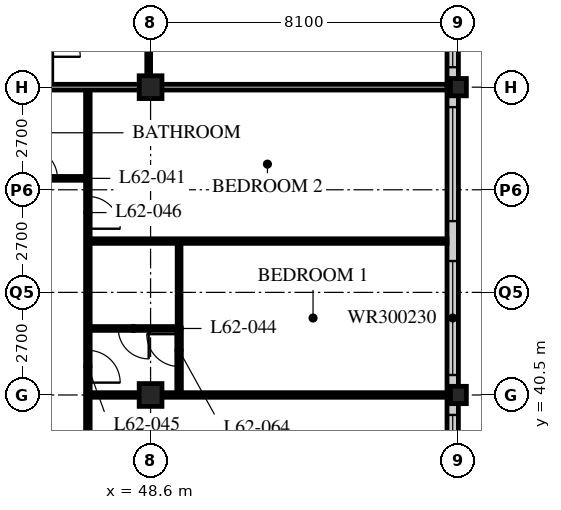
"""IFC4 building model, lengths in metres.
Left out: names, types, materials, properties, quantities, classifications, styles, units other than length and angle.
Written with IfcOpenShell. Run it as: python <this file> out.ifc"""

import sys

from ifc_helpers import new_model, si_unit, direction, frame, frame_2d, origin, origin_2d, place, context, subcontext, project, spatial, rectangle, hollow_rectangle, i_section, extrude, element, fill, save


model = new_model("IFC4")
c1 = context("Model", 3, precision=1e-05, world=origin(), true_north=direction((0.0, 1.0)))
c2 = subcontext(c1, "Body", "Model", "MODEL_VIEW")
j1 = project(units=[si_unit("LENGTHUNIT", "METRE"), si_unit("PLANEANGLEUNIT", "RADIAN")], contexts=[c1])
p1 = place(None, origin())
s1 = spatial("IfcSite", under=j1, at=p1, CompositionType="ELEMENT")
p2 = place(p1, origin())
s2 = spatial("IfcBuilding", under=s1, at=p2, CompositionType="ELEMENT")
p3 = place(p2, frame((0.0, 0.0, 242.4)))
s3 = spatial("IfcBuildingStorey", under=s2, at=p3, CompositionType="ELEMENT", Elevation=242.4)
for number, where, z_axis, x_axis in (
    (1, (48.6, 40.5, 0.0), (0.0, 0.0, 1.0), (1.0, 0.0, 0.0)),
    (2, (48.6, 48.6, 0.0), (0.0, 0.0, 1.0), (1.0, 0.0, 0.0)),
):
    element("IfcColumn", number, at=place(p3, frame(where, z_axis=z_axis, x_axis=x_axis)), inside=s3, PredefinedType="COLUMN", context=c2, shape_type="SweptSolid", body=[
        extrude(hollow_rectangle(XDim=0.6, YDim=0.6, WallThickness=0.05, at=origin_2d()), origin(), (0.0, 0.0, 1.0), 3.9),
    ])
for number, where, z_axis, x_axis in (
    (3, (56.7, 40.5, 0.0), (0.0, 0.0, 1.0), (1.0, 0.0, 0.0)),
    (4, (56.7, 48.6, 0.0), (0.0, 0.0, 1.0), (1.0, 0.0, 0.0)),
):
    element("IfcColumn", number, at=place(p3, frame(where, z_axis=z_axis, x_axis=x_axis)), inside=s3, PredefinedType="COLUMN", context=c2, shape_type="SweptSolid", body=[
        extrude(i_section(OverallWidth=0.418, OverallDepth=0.456, WebThickness=0.042, FlangeThickness=0.067, FilletRadius=0.015, at=origin_2d()), origin(), (0.0, 0.0, 1.0), 3.9),
    ])
p4 = place(p3, frame((56.55, 24.6, 0.0), z_axis=(0.0, 0.0, 1.0), x_axis=(0.0, 1.0, 0.0)))
e5 = element("IfcWall", 5, at=p4, inside=s3, PredefinedType="SOLIDWALL", context=c2, shape_type="SweptSolid", body=[
    extrude(rectangle(XDim=32.1, YDim=0.3, at=frame_2d((16.05, 0.0))), origin(), (0.0, 0.0, 1.0), 3.69),
])
p5 = place(p4, frame((0.225, 0.0, 0.6)))
e6 = element("IfcOpeningElement", 6, at=p5, cuts=e5, PredefinedType="OPENING", context=c2, shape_type="SweptSolid", body=[
    extrude(rectangle(XDim=3.0, YDim=2.3, at=frame_2d((1.5, 1.15))), frame((0.0, 0.16, 0.0), z_axis=(0.0, -1.0, 0.0), x_axis=(1.0, 0.0, 0.0)), (0.0, 0.0, 1.0), 0.32),
])
p6 = place(p4, frame((4.275, 0.0, 0.6)))
e7 = element("IfcOpeningElement", 7, at=p6, cuts=e5, PredefinedType="OPENING", context=c2, shape_type="SweptSolid", body=[
    extrude(rectangle(XDim=3.0, YDim=2.3, at=frame_2d((1.5, 1.15))), frame((0.0, 0.16, 0.0), z_axis=(0.0, -1.0, 0.0), x_axis=(1.0, 0.0, 0.0)), (0.0, 0.0, 1.0), 0.32),
])
p7 = place(p4, frame((8.325, 0.0, 0.6)))
e8 = element("IfcOpeningElement", 8, at=p7, cuts=e5, PredefinedType="OPENING", context=c2, shape_type="SweptSolid", body=[
    extrude(rectangle(XDim=3.0, YDim=2.3, at=frame_2d((1.5, 1.15))), frame((0.0, 0.16, 0.0), z_axis=(0.0, -1.0, 0.0), x_axis=(1.0, 0.0, 0.0)), (0.0, 0.0, 1.0), 0.32),
])
p8 = place(p4, frame((12.375, 0.0, 0.6)))
e9 = element("IfcOpeningElement", 9, at=p8, cuts=e5, PredefinedType="OPENING", context=c2, shape_type="SweptSolid", body=[
    extrude(rectangle(XDim=3.0, YDim=2.3, at=frame_2d((1.5, 1.15))), frame((0.0, 0.16, 0.0), z_axis=(0.0, -1.0, 0.0), x_axis=(1.0, 0.0, 0.0)), (0.0, 0.0, 1.0), 0.32),
])
p9 = place(p4, frame((16.425, 0.0, 0.6)))
e10 = element("IfcOpeningElement", 10, at=p9, cuts=e5, PredefinedType="OPENING", context=c2, shape_type="SweptSolid", body=[
    extrude(rectangle(XDim=3.0, YDim=2.3, at=frame_2d((1.5, 1.15))), frame((0.0, 0.16, 0.0), z_axis=(0.0, -1.0, 0.0), x_axis=(1.0, 0.0, 0.0)), (0.0, 0.0, 1.0), 0.32),
])
p10 = place(p4, frame((20.475, 0.0, 0.6)))
e11 = element("IfcOpeningElement", 11, at=p10, cuts=e5, PredefinedType="OPENING", context=c2, shape_type="SweptSolid", body=[
    extrude(rectangle(XDim=3.0, YDim=2.3, at=frame_2d((1.5, 1.15))), frame((0.0, 0.16, 0.0), z_axis=(0.0, -1.0, 0.0), x_axis=(1.0, 0.0, 0.0)), (0.0, 0.0, 1.0), 0.32),
])
p11 = place(p4, frame((24.525, 0.0, 0.6)))
e12 = element("IfcOpeningElement", 12, at=p11, cuts=e5, PredefinedType="OPENING", context=c2, shape_type="SweptSolid", body=[
    extrude(rectangle(XDim=3.0, YDim=2.3, at=frame_2d((1.5, 1.15))), frame((0.0, 0.16, 0.0), z_axis=(0.0, -1.0, 0.0), x_axis=(1.0, 0.0, 0.0)), (0.0, 0.0, 1.0), 0.32),
])
p12 = place(p4, frame((28.575, 0.0, 0.6)))
e13 = element("IfcOpeningElement", 13, at=p12, cuts=e5, PredefinedType="OPENING", context=c2, shape_type="SweptSolid", body=[
    extrude(rectangle(XDim=3.0, YDim=2.3, at=frame_2d((1.5, 1.15))), frame((0.0, 0.16, 0.0), z_axis=(0.0, -1.0, 0.0), x_axis=(1.0, 0.0, 0.0)), (0.0, 0.0, 1.0), 0.32),
])
p13 = place(p3, frame((46.95, 22.5, 0.0), z_axis=(0.0, 0.0, 1.0), x_axis=(0.0, 1.0, 0.0)))
e14 = element("IfcWall", 14, at=p13, inside=s3, PredefinedType="PARTITIONING", context=c2, shape_type="SweptSolid", body=[
    extrude(rectangle(XDim=26.1, YDim=0.12, at=frame_2d((13.05, 0.0))), origin(), (0.0, 0.0, 1.0), 3.69),
])
p14 = place(p13, frame((0.975, 0.0, 0.0)))
e15 = element("IfcOpeningElement", 15, at=p14, cuts=e14, PredefinedType="OPENING", context=c2, shape_type="SweptSolid", body=[
    extrude(rectangle(XDim=0.85, YDim=2.1, at=frame_2d((0.425, 1.05))), frame((0.0, 0.07, 0.0), z_axis=(0.0, -1.0, 0.0), x_axis=(1.0, 0.0, 0.0)), (0.0, 0.0, 1.0), 0.14),
])
p15 = place(p13, frame((6.175, 0.0, 0.0)))
e16 = element("IfcOpeningElement", 16, at=p15, cuts=e14, PredefinedType="OPENING", context=c2, shape_type="SweptSolid", body=[
    extrude(rectangle(XDim=0.85, YDim=2.1, at=frame_2d((0.425, 1.05))), frame((0.0, 0.07, 0.0), z_axis=(0.0, -1.0, 0.0), x_axis=(1.0, 0.0, 0.0)), (0.0, 0.0, 1.0), 0.14),
])
p16 = place(p13, frame((10.875, 0.0, 0.0)))
e17 = element("IfcOpeningElement", 17, at=p16, cuts=e14, PredefinedType="OPENING", context=c2, shape_type="SweptSolid", body=[
    extrude(rectangle(XDim=0.85, YDim=2.1, at=frame_2d((0.425, 1.05))), frame((0.0, 0.07, 0.0), z_axis=(0.0, -1.0, 0.0), x_axis=(1.0, 0.0, 0.0)), (0.0, 0.0, 1.0), 0.14),
])
p17 = place(p13, frame((18.325, 0.0, 0.0)))
e18 = element("IfcOpeningElement", 18, at=p17, cuts=e14, PredefinedType="OPENING", context=c2, shape_type="SweptSolid", body=[
    extrude(rectangle(XDim=0.85, YDim=2.1, at=frame_2d((0.425, 1.05))), frame((0.0, 0.07, 0.0), z_axis=(0.0, -1.0, 0.0), x_axis=(1.0, 0.0, 0.0)), (0.0, 0.0, 1.0), 0.14),
])
p18 = place(p13, frame((22.375, 0.0, 0.0)))
e19 = element("IfcOpeningElement", 19, at=p18, cuts=e14, PredefinedType="OPENING", context=c2, shape_type="SweptSolid", body=[
    extrude(rectangle(XDim=0.85, YDim=2.1, at=frame_2d((0.425, 1.05))), frame((0.0, 0.07, 0.0), z_axis=(0.0, -1.0, 0.0), x_axis=(1.0, 0.0, 0.0)), (0.0, 0.0, 1.0), 0.14),
])
p19 = place(p3, frame((44.55, 46.2, 0.0), z_axis=(0.0, 0.0, 1.0), x_axis=(1.0, 0.0, 0.0)))
e20 = element("IfcWall", 20, at=p19, inside=s3, PredefinedType="PARTITIONING", context=c2, shape_type="SweptSolid", body=[
    extrude(rectangle(XDim=2.4, YDim=0.1, at=frame_2d((1.2, 0.0))), origin(), (0.0, 0.0, 1.0), 3.69),
])
p20 = place(p19, frame((0.8, 0.0, 0.0)))
e21 = element("IfcOpeningElement", 21, at=p20, cuts=e20, PredefinedType="OPENING", context=c2, shape_type="SweptSolid", body=[
    extrude(rectangle(XDim=0.8, YDim=2.1, at=frame_2d((0.4, 1.05))), frame((0.0, 0.06, 0.0), z_axis=(0.0, -1.0, 0.0), x_axis=(1.0, 0.0, 0.0)), (0.0, 0.0, 1.0), 0.12),
])
p21 = place(p3, frame((46.95, 42.25, 0.0), z_axis=(0.0, 0.0, 1.0), x_axis=(1.0, 0.0, 0.0)))
e22 = element("IfcWall", 22, at=p21, inside=s3, PredefinedType="PARTITIONING", context=c2, shape_type="SweptSolid", body=[
    extrude(rectangle(XDim=2.4, YDim=0.1, at=frame_2d((1.2, 0.0))), origin(), (0.0, 0.0, 1.0), 3.69),
])
p22 = place(p21, frame((0.8, 0.0, 0.0)))
e23 = element("IfcOpeningElement", 23, at=p22, cuts=e22, PredefinedType="OPENING", context=c2, shape_type="SweptSolid", body=[
    extrude(rectangle(XDim=0.8, YDim=2.1, at=frame_2d((0.4, 1.05))), frame((0.0, 0.06, 0.0), z_axis=(0.0, -1.0, 0.0), x_axis=(1.0, 0.0, 0.0)), (0.0, 0.0, 1.0), 0.12),
])
p23 = place(p3, frame((49.35, 42.25, 0.0), z_axis=(0.0, 0.0, 1.0), x_axis=(0.0, 1.0, 0.0)))
e24 = element("IfcWall", 24, at=p23, inside=s3, PredefinedType="PARTITIONING", context=c2, shape_type="SweptSolid", body=[
    extrude(rectangle(XDim=2.3, YDim=0.1, at=frame_2d((1.15, 0.0))), origin(), (0.0, 0.0, 1.0), 3.69),
])
p24 = place(p3, frame((46.95, 40.5, 0.0), z_axis=(0.0, 0.0, 1.0), x_axis=(1.0, 0.0, 0.0)))
e25 = element("IfcWall", 25, at=p24, inside=s3, PredefinedType="PARTITIONING", context=c2, shape_type="SweptSolid", body=[
    extrude(rectangle(XDim=9.45, YDim=0.12, at=frame_2d((4.725, 0.0))), origin(), (0.0, 0.0, 1.0), 2.928),
])
p25 = place(p3, frame((46.95, 44.55, 0.0), z_axis=(0.0, 0.0, 1.0), x_axis=(1.0, 0.0, 0.0)))
e26 = element("IfcWall", 26, at=p25, inside=s3, PredefinedType="PARTITIONING", context=c2, shape_type="SweptSolid", body=[
    extrude(rectangle(XDim=9.45, YDim=0.12, at=frame_2d((4.725, 0.0))), origin(), (0.0, 0.0, 1.0), 3.69),
])
p26 = place(p3, frame((48.55, 48.6, 0.0), z_axis=(0.0, 0.0, 1.0), x_axis=(0.0, 1.0, 0.0)))
e27 = element("IfcWall", 27, at=p26, inside=s3, PredefinedType="PARTITIONING", context=c2, shape_type="SweptSolid", body=[
    extrude(rectangle(XDim=2.4, YDim=0.1, at=frame_2d((1.2, 0.0))), origin(), (0.0, 0.0, 1.0), 2.928),
])
p27 = place(p3, frame((44.55, 48.6, 0.0), z_axis=(0.0, 0.0, 1.0), x_axis=(1.0, 0.0, 0.0)))
e28 = element("IfcWall", 28, at=p27, inside=s3, PredefinedType="PARTITIONING", context=c2, shape_type="SweptSolid", body=[
    extrude(rectangle(XDim=11.85, YDim=0.15, at=frame_2d((5.925, 0.0))), origin(), (0.0, 0.0, 1.0), 2.928),
])
p28 = place(p3, frame((49.35, 42.26, 0.0), z_axis=(0.0, 0.0, 1.0), x_axis=(0.0, -1.0, 0.0)))
e29 = element("IfcWall", 29, at=p28, inside=s3, PredefinedType="PARTITIONING", context=c2, shape_type="SweptSolid", body=[
    extrude(rectangle(XDim=1.76, YDim=0.12, at=frame_2d((0.88, 0.0))), origin(), (0.0, 0.0, 1.0), 3.69),
])
p29 = place(p28, frame((0.16, 0.0, 0.0)))
e30 = element("IfcOpeningElement", 30, at=p29, cuts=e29, PredefinedType="OPENING", context=c2, shape_type="SweptSolid", body=[
    extrude(rectangle(XDim=0.85, YDim=2.1, at=frame_2d((0.425, 1.05))), frame((0.0, 0.07, 0.0), z_axis=(0.0, -1.0, 0.0), x_axis=(1.0, 0.0, 0.0)), (0.0, 0.0, 1.0), 0.14),
])
p30 = place(p8, origin())
e31 = element("IfcWindow", 31, at=p30, inside=s3, PartitioningType="SINGLE_PANEL", PredefinedType="WINDOW", context=c2, shape_type="SweptSolid", body=[
    extrude(rectangle(XDim=3.0, YDim=2.3, at=frame_2d((1.5, 1.15))), frame((0.0, 0.03, 0.0), z_axis=(0.0, -1.0, 0.0), x_axis=(1.0, 0.0, 0.0)), (0.0, 0.0, 1.0), 0.06),
])
fill(e9, e31)
p31 = place(p9, origin())
e32 = element("IfcWindow", 32, at=p31, inside=s3, PartitioningType="SINGLE_PANEL", PredefinedType="WINDOW", context=c2, shape_type="SweptSolid", body=[
    extrude(rectangle(XDim=3.0, YDim=2.3, at=frame_2d((1.5, 1.15))), frame((0.0, 0.03, 0.0), z_axis=(0.0, -1.0, 0.0), x_axis=(1.0, 0.0, 0.0)), (0.0, 0.0, 1.0), 0.06),
])
fill(e10, e32)
p32 = place(p10, origin())
e33 = element("IfcWindow", 33, at=p32, inside=s3, PartitioningType="SINGLE_PANEL", PredefinedType="WINDOW", context=c2, shape_type="SweptSolid", body=[
    extrude(rectangle(XDim=3.0, YDim=2.3, at=frame_2d((1.5, 1.15))), frame((0.0, 0.03, 0.0), z_axis=(0.0, -1.0, 0.0), x_axis=(1.0, 0.0, 0.0)), (0.0, 0.0, 1.0), 0.06),
])
fill(e11, e33)
p33 = place(p11, origin())
e34 = element("IfcWindow", 34, at=p33, inside=s3, PartitioningType="SINGLE_PANEL", PredefinedType="WINDOW", context=c2, shape_type="SweptSolid", body=[
    extrude(rectangle(XDim=3.0, YDim=2.3, at=frame_2d((1.5, 1.15))), frame((0.0, 0.03, 0.0), z_axis=(0.0, -1.0, 0.0), x_axis=(1.0, 0.0, 0.0)), (0.0, 0.0, 1.0), 0.06),
])
fill(e12, e34)
p34 = place(p20, origin())
e35 = element("IfcDoor", 35, at=p34, inside=s3, OperationType="SINGLE_SWING_LEFT", PredefinedType="DOOR", context=c2, shape_type="SweptSolid", body=[
    extrude(rectangle(XDim=0.8, YDim=2.1, at=frame_2d((0.4, 1.05))), frame((0.0, 0.025, 0.0), z_axis=(0.0, -1.0, 0.0), x_axis=(1.0, 0.0, 0.0)), (0.0, 0.0, 1.0), 0.05),
])
fill(e21, e35)
p35 = place(p22, origin())
e36 = element("IfcDoor", 36, at=p35, inside=s3, OperationType="SINGLE_SWING_LEFT", PredefinedType="DOOR", context=c2, shape_type="SweptSolid", body=[
    extrude(rectangle(XDim=0.8, YDim=2.1, at=frame_2d((0.4, 1.05))), frame((0.0, 0.025, 0.0), z_axis=(0.0, -1.0, 0.0), x_axis=(1.0, 0.0, 0.0)), (0.0, 0.0, 1.0), 0.05),
])
fill(e23, e36)
p36 = place(p17, origin())
e37 = element("IfcDoor", 37, at=p36, inside=s3, OperationType="SINGLE_SWING_RIGHT", PredefinedType="DOOR", context=c2, shape_type="SweptSolid", body=[
    extrude(rectangle(XDim=0.85, YDim=2.1, at=frame_2d((0.425, 1.05))), frame((0.0, 0.025, 0.0), z_axis=(0.0, -1.0, 0.0), x_axis=(1.0, 0.0, 0.0)), (0.0, 0.0, 1.0), 0.05),
])
fill(e18, e37)
p37 = place(p18, origin())
e38 = element("IfcDoor", 38, at=p37, inside=s3, OperationType="SINGLE_SWING_RIGHT", PredefinedType="DOOR", context=c2, shape_type="SweptSolid", body=[
    extrude(rectangle(XDim=0.85, YDim=2.1, at=frame_2d((0.425, 1.05))), frame((0.0, 0.025, 0.0), z_axis=(0.0, -1.0, 0.0), x_axis=(1.0, 0.0, 0.0)), (0.0, 0.0, 1.0), 0.05),
])
fill(e19, e38)
p38 = place(p29, origin())
e39 = element("IfcDoor", 39, at=p38, inside=s3, OperationType="SINGLE_SWING_RIGHT", PredefinedType="DOOR", context=c2, shape_type="SweptSolid", body=[
    extrude(rectangle(XDim=0.85, YDim=2.1, at=frame_2d((0.425, 1.05))), frame((0.0, 0.025, 0.0), z_axis=(0.0, -1.0, 0.0), x_axis=(1.0, 0.0, 0.0)), (0.0, 0.0, 1.0), 0.05),
])
fill(e30, e39)
save(model, sys.argv[1])
